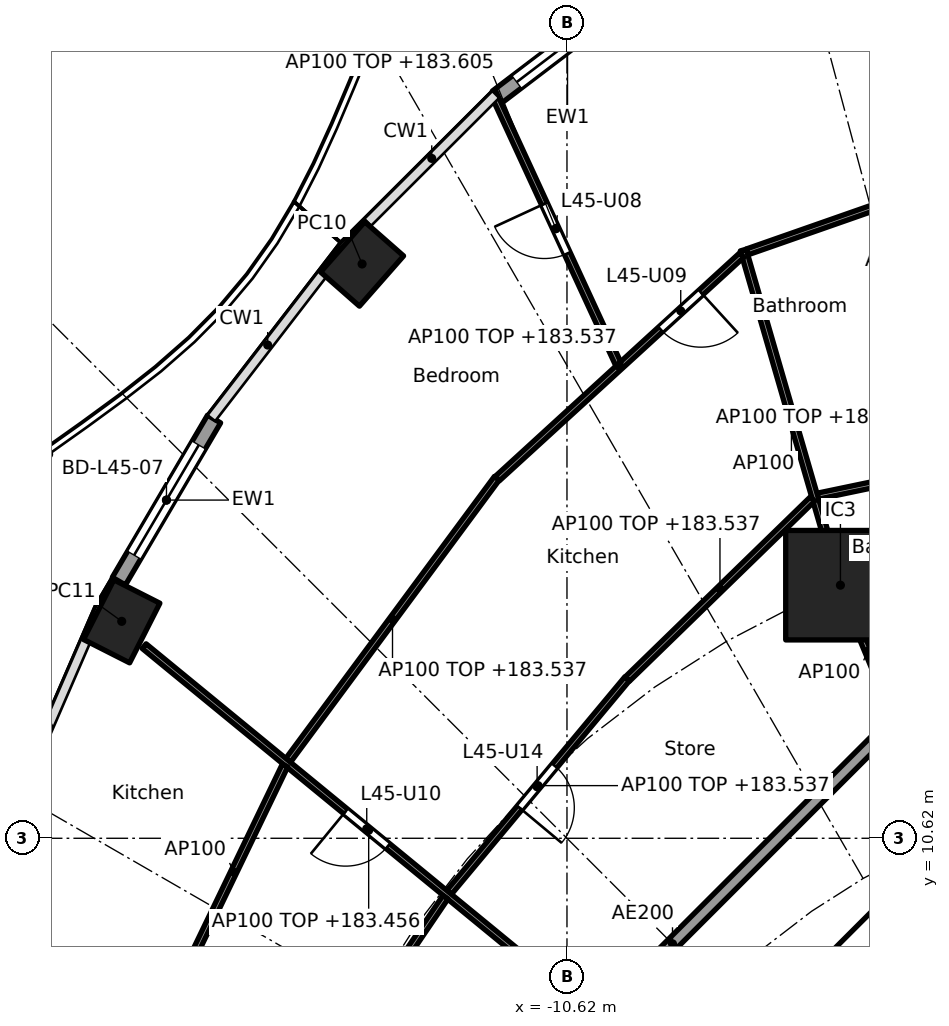
"""IFC4 building model, lengths in metres.
Left out: names, types, materials, properties, quantities, classifications, styles, units other than length and angle.
Written with IfcOpenShell. Run it as: python <this file> out.ifc"""

import sys

from ifc_helpers import new_model, si_unit, direction, frame, frame_2d, origin, origin_2d, place, context, subcontext, project, spatial, rectangle, hollow_rectangle, extrude, element, fill, save


model = new_model("IFC4")
c1 = context("Model", 3, precision=1e-05, world=origin(), true_north=direction((0.0, 1.0)))
c2 = subcontext(c1, "Body", "Model", "MODEL_VIEW")
j1 = project(units=[si_unit("LENGTHUNIT", "METRE"), si_unit("PLANEANGLEUNIT", "RADIAN")], contexts=[c1])
p1 = place(None, origin())
s1 = spatial("IfcSite", under=j1, at=p1, CompositionType="ELEMENT")
p2 = place(p1, origin())
s2 = spatial("IfcBuilding", under=s1, at=p2, CompositionType="ELEMENT")
p3 = place(p2, frame((0.0, 0.0, 180.7)))
s3 = spatial("IfcBuildingStorey", under=s2, at=p3, CompositionType="ELEMENT", Elevation=180.7)
for number, where, z_axis, x_axis in (
    (1, (-13.989, 20.064, 0.0), (0.0, 0.0, 1.0), (-0.66, -0.751, 0.0)),
    (2, (-17.942, 14.188, 0.0), (0.0, 0.0, 1.0), (-0.452, -0.892, 0.0)),
):
    element("IfcColumn", number, at=place(p3, frame(where, z_axis=z_axis, x_axis=x_axis)), inside=s3, PredefinedType="COLUMN", context=c2, shape_type="SweptSolid", body=[
        extrude(hollow_rectangle(XDim=1.1, YDim=0.85, WallThickness=0.036, at=origin_2d()), origin(), (0.0, 0.0, 1.0), 3.7),
    ])
p4 = place(p3, frame((-6.123, 14.782, 0.0), z_axis=(0.0, 0.0, 1.0), x_axis=(1.0, 0.0, 0.0)))
e3 = element("IfcColumn", 3, at=p4, inside=s3, PredefinedType="COLUMN", context=c2, shape_type="SweptSolid", body=[
    extrude(rectangle(XDim=1.8, YDim=1.8, at=origin_2d()), origin(), (0.0, 0.0, 1.0), 3.7),
])
p5 = place(p3, frame((-11.772, 22.809, 0.0), z_axis=(0.0, 0.0, 1.0), x_axis=(0.796055733703, 0.60522332146, 0.0)))
e4 = element("IfcWall", 4, at=p5, inside=s3, PredefinedType="SOLIDWALL", context=c2, shape_type="SweptSolid", body=[
    extrude(rectangle(XDim=2.917, YDim=0.25, at=frame_2d((1.458, 0.0))), origin(), (0.0, 0.0, 1.0), 3.44),
])
p6 = place(p5, frame((0.408, 0.0, 0.0)))
e5 = element("IfcOpeningElement", 5, at=p6, cuts=e4, PredefinedType="OPENING", context=c2, shape_type="SweptSolid", body=[
    extrude(rectangle(XDim=2.1, YDim=2.4, at=frame_2d((1.05, 1.2))), frame((0.0, 0.135, 0.0), z_axis=(0.0, -1.0, 0.0), x_axis=(1.0, 0.0, 0.0)), (0.0, 0.0, 1.0), 0.27),
])
p7 = place(p3, frame((-17.989, 14.848, 0.0), z_axis=(0.0, 0.0, 1.0), x_axis=(0.506309086483, 0.862352079458, 0.0)))
e6 = element("IfcWall", 6, at=p7, inside=s3, PredefinedType="SOLIDWALL", context=c2, shape_type="SweptSolid", body=[
    extrude(rectangle(XDim=3.092, YDim=0.25, at=frame_2d((1.546, 0.0))), origin(), (0.0, 0.0, 1.0), 3.44),
])
p8 = place(p7, frame((0.496, 0.0, 0.0)))
e7 = element("IfcOpeningElement", 7, at=p8, cuts=e6, PredefinedType="OPENING", context=c2, shape_type="SweptSolid", body=[
    extrude(rectangle(XDim=2.1, YDim=2.4, at=frame_2d((1.05, 1.2))), frame((0.0, 0.135, 0.0), z_axis=(0.0, -1.0, 0.0), x_axis=(1.0, 0.0, 0.0)), (0.0, 0.0, 1.0), 0.27),
])
p9 = place(p3, frame((-4.613, 9.988, 0.0), z_axis=(0.0, 0.0, 1.0), x_axis=(-0.707106781187, -0.707106781187, 0.0)))
e8 = element("IfcWall", 8, at=p9, inside=s3, PredefinedType="SHEAR", context=c2, shape_type="SweptSolid", body=[
    extrude(rectangle(XDim=7.602, YDim=0.6, at=frame_2d((3.801, 0.0))), origin(), (0.0, 0.0, 1.0), 3.44),
])
p10 = place(p9, frame((0.351, 0.0, 0.0)))
e9 = element("IfcOpeningElement", 9, at=p10, cuts=e8, PredefinedType="OPENING", context=c2, shape_type="SweptSolid", body=[
    extrude(rectangle(XDim=1.1, YDim=2.1, at=frame_2d((0.55, 1.05))), frame((0.0, 0.31, 0.0), z_axis=(0.0, -1.0, 0.0), x_axis=(1.0, 0.0, 0.0)), (0.0, 0.0, 1.0), 0.62),
])
p11 = place(p3, frame((-5.275, 12.494, 0.0), z_axis=(0.0, 0.0, 1.0), x_axis=(-0.707106781187, -0.707106781187, 0.0)))
e10 = element("IfcWall", 10, at=p11, inside=s3, PredefinedType="PARTITIONING", context=c2, shape_type="SweptSolid", body=[
    extrude(rectangle(XDim=10.209, YDim=0.2, at=frame_2d((5.104, 0.0))), origin(), (0.0, 0.0, 1.0), 3.44),
])
p12 = place(p3, frame((-2.452, 22.083, 0.0), z_axis=(0.0, 0.0, 1.0), x_axis=(-0.943916289103, -0.330184856051, 0.0)))
e11 = element("IfcWall", 11, at=p12, inside=s3, PredefinedType="PARTITIONING", context=c2, shape_type="SweptSolid", body=[
    extrude(rectangle(XDim=5.517, YDim=0.1, at=frame_2d((2.759, 0.0))), origin(), (0.0, 0.0, 1.0), 2.837),
])
p13 = place(p12, frame((0.979, 0.0, 0.0)))
e12 = element("IfcOpeningElement", 12, at=p13, cuts=e11, PredefinedType="OPENING", context=c2, shape_type="SweptSolid", body=[
    extrude(rectangle(XDim=0.9, YDim=2.1, at=frame_2d((0.45, 1.05))), frame((0.0, 0.06, 0.0), z_axis=(0.0, -1.0, 0.0), x_axis=(1.0, 0.0, 0.0)), (0.0, 0.0, 1.0), 0.12),
])
p14 = place(p3, frame((-4.324, 16.699, 0.0), z_axis=(0.0, 0.0, 1.0), x_axis=(-0.978908011866, -0.204301503432, 0.0)))
e13 = element("IfcWall", 13, at=p14, inside=s3, PredefinedType="PARTITIONING", context=c2, shape_type="SweptSolid", body=[
    extrude(rectangle(XDim=2.218, YDim=0.1, at=frame_2d((1.109, 0.0))), origin(), (0.0, 0.0, 1.0), 2.837),
])
p15 = place(p3, frame((-5.243, 12.657, 0.0), z_axis=(0.0, 0.0, 1.0), x_axis=(-0.382719158442, 0.923864733477, 0.0)))
e14 = element("IfcWall", 14, at=p15, inside=s3, PredefinedType="PARTITIONING", context=c2, shape_type="SweptSolid", body=[
    extrude(rectangle(XDim=2.25, YDim=0.1, at=frame_2d((1.125, 0.0))), origin(), (0.0, 0.0, 1.0), 3.44),
])
p16 = place(p3, frame((-6.137, 14.83, 0.0), z_axis=(0.0, 0.0, 1.0), x_axis=(-0.278471793245, 0.960444407744, 0.0)))
e15 = element("IfcWall", 15, at=p16, inside=s3, PredefinedType="PARTITIONING", context=c2, shape_type="SweptSolid", body=[
    extrude(rectangle(XDim=5.688, YDim=0.1, at=frame_2d((2.844, 0.0))), origin(), (0.0, 0.0, 1.0), 3.44),
])
p17 = place(p3, frame((-6.58, 16.201, 0.0), z_axis=(0.0, 0.0, 1.0), x_axis=(-0.716946269374, -0.697128429223, 0.0)))
e16 = element("IfcWall", 16, at=p17, inside=s3, PredefinedType="PARTITIONING", context=c2, shape_type="SweptSolid", body=[
    extrude(rectangle(XDim=4.25, YDim=0.1, at=frame_2d((2.125, 0.0))), origin(), (0.0, 0.0, 1.0), 2.837),
])
p18 = place(p3, frame((-7.744, 20.212, 0.0), z_axis=(0.0, 0.0, 1.0), x_axis=(-0.738051761282, -0.674744097913, 0.0)))
e17 = element("IfcWall", 17, at=p18, inside=s3, PredefinedType="PARTITIONING", context=c2, shape_type="SweptSolid", body=[
    extrude(rectangle(XDim=5.449, YDim=0.1, at=frame_2d((2.725, 0.0))), origin(), (0.0, 0.0, 1.0), 2.837),
])
p19 = place(p18, frame((0.912, 0.0, 0.0)))
e18 = element("IfcOpeningElement", 18, at=p19, cuts=e17, PredefinedType="OPENING", context=c2, shape_type="SweptSolid", body=[
    extrude(rectangle(XDim=0.9, YDim=2.1, at=frame_2d((0.45, 1.05))), frame((0.0, 0.06, 0.0), z_axis=(0.0, -1.0, 0.0), x_axis=(1.0, 0.0, 0.0)), (0.0, 0.0, 1.0), 0.12),
])
p20 = place(p3, frame((-9.776, 18.419, 0.0), z_axis=(0.0, 0.0, 1.0), x_axis=(-0.418998197727, 0.907987065052, 0.0)))
e19 = element("IfcWall", 19, at=p20, inside=s3, PredefinedType="PARTITIONING", context=c2, shape_type="SweptSolid", body=[
    extrude(rectangle(XDim=4.904, YDim=0.1, at=frame_2d((2.452, 0.0))), origin(), (0.0, 0.0, 1.0), 2.905),
])
p21 = place(p20, frame((2.002, 0.0, 0.0)))
e20 = element("IfcOpeningElement", 20, at=p21, cuts=e19, PredefinedType="OPENING", context=c2, shape_type="SweptSolid", body=[
    extrude(rectangle(XDim=0.9, YDim=2.1, at=frame_2d((0.45, 1.05))), frame((0.0, 0.06, 0.0), z_axis=(0.0, -1.0, 0.0), x_axis=(1.0, 0.0, 0.0)), (0.0, 0.0, 1.0), 0.12),
])
p22 = place(p3, frame((-9.631, 13.242, 0.0), z_axis=(0.0, 0.0, 1.0), x_axis=(-0.640315711982, -0.768111833647, 0.0)))
e21 = element("IfcWall", 21, at=p22, inside=s3, PredefinedType="PARTITIONING", context=c2, shape_type="SweptSolid", body=[
    extrude(rectangle(XDim=4.572, YDim=0.1, at=frame_2d((2.286, 0.0))), origin(), (0.0, 0.0, 1.0), 2.837),
])
p23 = place(p22, frame((1.861, 0.0, 0.0)))
e22 = element("IfcOpeningElement", 22, at=p23, cuts=e21, PredefinedType="OPENING", context=c2, shape_type="SweptSolid", body=[
    extrude(rectangle(XDim=0.9, YDim=2.1, at=frame_2d((0.45, 1.05))), frame((0.0, 0.06, 0.0), z_axis=(0.0, -1.0, 0.0), x_axis=(1.0, 0.0, 0.0)), (0.0, 0.0, 1.0), 0.12),
])
p24 = place(p3, frame((-11.773, 16.542, 0.0), z_axis=(0.0, 0.0, 1.0), x_axis=(-0.594694305999, -0.803951915485, 0.0)))
e23 = element("IfcWall", 23, at=p24, inside=s3, PredefinedType="PARTITIONING", context=c2, shape_type="SweptSolid", body=[
    extrude(rectangle(XDim=5.772, YDim=0.1, at=frame_2d((2.886, 0.0))), origin(), (0.0, 0.0, 1.0), 2.837),
])
p25 = place(p3, frame((-10.189, 7.721, 0.0), z_axis=(0.0, 0.0, 1.0), x_axis=(-0.773134429339, 0.634242188892, 0.0)))
e24 = element("IfcWall", 24, at=p25, inside=s3, PredefinedType="PARTITIONING", context=c2, shape_type="SweptSolid", body=[
    extrude(rectangle(XDim=9.552, YDim=0.1, at=frame_2d((4.776, 0.0))), origin(), (0.0, 0.0, 1.0), 2.756),
])
p26 = place(p25, frame((4.367, 0.0, 0.0)))
e25 = element("IfcOpeningElement", 25, at=p26, cuts=e24, PredefinedType="OPENING", context=c2, shape_type="SweptSolid", body=[
    extrude(rectangle(XDim=0.9, YDim=2.1, at=frame_2d((0.45, 1.05))), frame((0.0, 0.06, 0.0), z_axis=(0.0, -1.0, 0.0), x_axis=(1.0, 0.0, 0.0)), (0.0, 0.0, 1.0), 0.12),
])
p27 = place(p3, frame((-12.619, 9.65, 0.0), z_axis=(0.0, 0.0, 1.0), x_axis=(-0.561064907171, -0.827771810308, 0.0)))
e26 = element("IfcWall", 26, at=p27, inside=s3, PredefinedType="PARTITIONING", context=c2, shape_type="SweptSolid", body=[
    extrude(rectangle(XDim=4.159, YDim=0.1, at=frame_2d((2.079, 0.0))), origin(), (0.0, 0.0, 1.0), 3.44),
])
p28 = place(p27, frame((1.629, 0.0, 0.0)))
e27 = element("IfcOpeningElement", 27, at=p28, cuts=e26, PredefinedType="OPENING", context=c2, shape_type="SweptSolid", body=[
    extrude(rectangle(XDim=0.9, YDim=2.1, at=frame_2d((0.45, 1.05))), frame((0.0, 0.06, 0.0), z_axis=(0.0, -1.0, 0.0), x_axis=(1.0, 0.0, 0.0)), (0.0, 0.0, 1.0), 0.12),
])
p29 = place(p3, frame((-15.257, 11.816, 0.0), z_axis=(0.0, 0.0, 1.0), x_axis=(-0.434040130629, -0.900893536997, 0.0)))
e28 = element("IfcWall", 28, at=p29, inside=s3, PredefinedType="PARTITIONING", context=c2, shape_type="SweptSolid", body=[
    extrude(rectangle(XDim=5.558, YDim=0.1, at=frame_2d((2.779, 0.0))), origin(), (0.0, 0.0, 1.0), 3.44),
])
p30 = place(p6, origin())
e29 = element("IfcDoor", 29, at=p30, inside=s3, OperationType="SLIDING_TO_LEFT", PredefinedType="DOOR", context=c2, shape_type="SweptSolid", body=[
    extrude(rectangle(XDim=2.1, YDim=2.4, at=frame_2d((1.05, 1.2))), frame((0.0, 0.025, 0.0), z_axis=(0.0, -1.0, 0.0), x_axis=(1.0, 0.0, 0.0)), (0.0, 0.0, 1.0), 0.05),
])
fill(e5, e29)
p31 = place(p8, origin())
e30 = element("IfcDoor", 30, at=p31, inside=s3, OperationType="SLIDING_TO_LEFT", PredefinedType="DOOR", context=c2, shape_type="SweptSolid", body=[
    extrude(rectangle(XDim=2.1, YDim=2.4, at=frame_2d((1.05, 1.2))), frame((0.0, 0.025, 0.0), z_axis=(0.0, -1.0, 0.0), x_axis=(1.0, 0.0, 0.0)), (0.0, 0.0, 1.0), 0.05),
])
fill(e7, e30)
p32 = place(p21, origin())
e31 = element("IfcDoor", 31, at=p32, inside=s3, OperationType="SINGLE_SWING_RIGHT", PredefinedType="DOOR", context=c2, shape_type="SweptSolid", body=[
    extrude(rectangle(XDim=0.9, YDim=2.1, at=frame_2d((0.45, 1.05))), frame((0.0, 0.025, 0.0), z_axis=(0.0, -1.0, 0.0), x_axis=(1.0, 0.0, 0.0)), (0.0, 0.0, 1.0), 0.05),
])
fill(e20, e31)
p33 = place(p19, origin())
e32 = element("IfcDoor", 32, at=p33, inside=s3, OperationType="SINGLE_SWING_LEFT", PredefinedType="DOOR", context=c2, shape_type="SweptSolid", body=[
    extrude(rectangle(XDim=0.9, YDim=2.1, at=frame_2d((0.45, 1.05))), frame((0.0, 0.025, 0.0), z_axis=(0.0, -1.0, 0.0), x_axis=(1.0, 0.0, 0.0)), (0.0, 0.0, 1.0), 0.05),
])
fill(e18, e32)
p34 = place(p26, origin())
e33 = element("IfcDoor", 33, at=p34, inside=s3, OperationType="SINGLE_SWING_RIGHT", PredefinedType="DOOR", context=c2, shape_type="SweptSolid", body=[
    extrude(rectangle(XDim=0.9, YDim=2.1, at=frame_2d((0.45, 1.05))), frame((0.0, 0.025, 0.0), z_axis=(0.0, -1.0, 0.0), x_axis=(1.0, 0.0, 0.0)), (0.0, 0.0, 1.0), 0.05),
])
fill(e25, e33)
p35 = place(p23, origin())
e34 = element("IfcDoor", 34, at=p35, inside=s3, OperationType="SINGLE_SWING_RIGHT", PredefinedType="DOOR", context=c2, shape_type="SweptSolid", body=[
    extrude(rectangle(XDim=0.9, YDim=2.1, at=frame_2d((0.45, 1.05))), frame((0.0, 0.025, 0.0), z_axis=(0.0, -1.0, 0.0), x_axis=(1.0, 0.0, 0.0)), (0.0, 0.0, 1.0), 0.05),
])
fill(e22, e34)
save(model, sys.argv[1])
